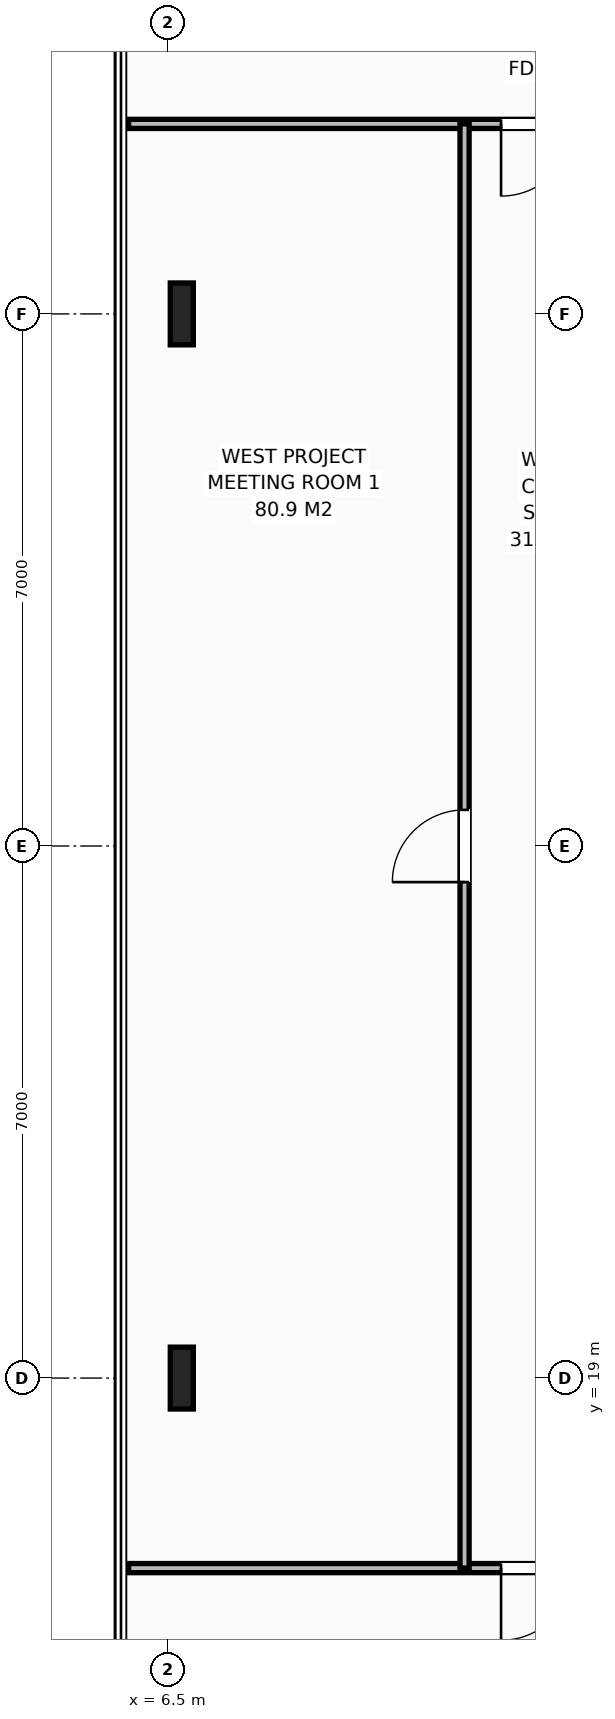
"""IFC4 building model, lengths in metres.
Left out: names, types, materials, properties, quantities, classifications, styles, units other than length and angle.
Written with IfcOpenShell. Run it as: python <this file> out.ifc"""

import sys

from ifc_helpers import new_model, si_unit, direction, frame, frame_2d, origin, origin_2d, place, context, subcontext, project, spatial, rectangle, i_section, extrude, element, fill, save


model = new_model("IFC4")
c1 = context("Model", 3, precision=1e-05, world=origin(), true_north=direction((0.0, 1.0)))
c2 = subcontext(c1, "Body", "Model", "MODEL_VIEW")
j1 = project(units=[si_unit("LENGTHUNIT", "METRE"), si_unit("PLANEANGLEUNIT", "RADIAN")], contexts=[c1])
p1 = place(None, origin())
s1 = spatial("IfcSite", under=j1, at=p1, CompositionType="ELEMENT")
p2 = place(p1, origin())
s2 = spatial("IfcBuilding", under=s1, at=p2, CompositionType="ELEMENT")
p3 = place(p2, frame((0.0, 0.0, 244.2)))
s3 = spatial("IfcBuildingStorey", under=s2, at=p3, CompositionType="ELEMENT", Elevation=244.2)
for number, where, z_axis, x_axis in (
    (1, (6.68, 19.0, 0.0), (0.0, 0.0, 1.0), (1.0, 0.0, 0.0)),
    (2, (6.68, 33.0, 0.0), (0.0, 0.0, 1.0), (1.0, 0.0, 0.0)),
):
    element("IfcColumn", number, at=place(p3, frame(where, z_axis=z_axis, x_axis=x_axis)), inside=s3, PredefinedType="COLUMN", context=c2, shape_type="SweptSolid", body=[
        extrude(i_section(OverallWidth=0.303, OverallDepth=0.814, WebThickness=0.021, FlangeThickness=0.04, at=origin_2d()), origin(), (0.0, 0.0, 1.0), 3.8),
    ])
p4 = place(p3, frame((5.98, 35.5, 0.0), z_axis=(0.0, 0.0, 1.0), x_axis=(1.0, 0.0, 0.0)))
e3 = element("IfcWall", 3, at=p4, inside=s3, PredefinedType="PARTITIONING", context=c2, shape_type="SweptSolid", body=[
    extrude(rectangle(XDim=11.642, YDim=0.12, at=frame_2d((5.821, 0.0))), origin(), (0.0, 0.0, 1.0), 3.58),
])
p5 = place(p4, frame((4.9, 0.0, 0.0)))
e4 = element("IfcOpeningElement", 4, at=p5, cuts=e3, PredefinedType="OPENING", context=c2, shape_type="SweptSolid", body=[
    extrude(rectangle(XDim=0.95, YDim=2.15, at=frame_2d((0.475, 1.075))), frame((0.0, 0.07, 0.0), z_axis=(0.0, -1.0, 0.0), x_axis=(1.0, 0.0, 0.0)), (0.0, 0.0, 1.0), 0.14),
])
p6 = place(p3, frame((5.98, 16.5, 0.0), z_axis=(0.0, 0.0, 1.0), x_axis=(1.0, 0.0, 0.0)))
e5 = element("IfcWall", 5, at=p6, inside=s3, PredefinedType="PARTITIONING", context=c2, shape_type="SweptSolid", body=[
    extrude(rectangle(XDim=7.16, YDim=0.12, at=frame_2d((3.58, 0.0))), origin(), (0.0, 0.0, 1.0), 3.58),
])
p7 = place(p6, frame((4.9, 0.0, 0.0)))
e6 = element("IfcOpeningElement", 6, at=p7, cuts=e5, PredefinedType="OPENING", context=c2, shape_type="SweptSolid", body=[
    extrude(rectangle(XDim=0.95, YDim=2.15, at=frame_2d((0.475, 1.075))), frame((0.0, 0.07, 0.0), z_axis=(0.0, -1.0, 0.0), x_axis=(1.0, 0.0, 0.0)), (0.0, 0.0, 1.0), 0.14),
])
p8 = place(p3, frame((10.4, 16.5, 0.0), z_axis=(0.0, 0.0, 1.0), x_axis=(0.0, 1.0, 0.0)))
e7 = element("IfcWall", 7, at=p8, inside=s3, PredefinedType="PARTITIONING", context=c2, shape_type="SweptSolid", body=[
    extrude(rectangle(XDim=19.0, YDim=0.12, at=frame_2d((9.5, 0.0))), origin(), (0.0, 0.0, 1.0), 3.58),
])
p9 = place(p8, frame((9.025, 0.0, 0.0)))
e8 = element("IfcOpeningElement", 8, at=p9, cuts=e7, PredefinedType="OPENING", context=c2, shape_type="SweptSolid", body=[
    extrude(rectangle(XDim=0.95, YDim=2.15, at=frame_2d((0.475, 1.075))), frame((0.0, 0.07, 0.0), z_axis=(0.0, -1.0, 0.0), x_axis=(1.0, 0.0, 0.0)), (0.0, 0.0, 1.0), 0.14),
])
p10 = place(p5, origin())
e9 = element("IfcDoor", 9, at=p10, inside=s3, OperationType="SINGLE_SWING_RIGHT", PredefinedType="DOOR", context=c2, shape_type="SweptSolid", body=[
    extrude(rectangle(XDim=0.95, YDim=2.15, at=frame_2d((0.475, 1.075))), frame((0.0, 0.025, 0.0), z_axis=(0.0, -1.0, 0.0), x_axis=(1.0, 0.0, 0.0)), (0.0, 0.0, 1.0), 0.05),
])
fill(e4, e9)
p11 = place(p7, origin())
e10 = element("IfcDoor", 10, at=p11, inside=s3, OperationType="SINGLE_SWING_RIGHT", PredefinedType="DOOR", context=c2, shape_type="SweptSolid", body=[
    extrude(rectangle(XDim=0.95, YDim=2.15, at=frame_2d((0.475, 1.075))), frame((0.0, 0.025, 0.0), z_axis=(0.0, -1.0, 0.0), x_axis=(1.0, 0.0, 0.0)), (0.0, 0.0, 1.0), 0.05),
])
fill(e6, e10)
p12 = place(p9, origin())
e11 = element("IfcDoor", 11, at=p12, inside=s3, OperationType="SINGLE_SWING_LEFT", PredefinedType="DOOR", context=c2, shape_type="SweptSolid", body=[
    extrude(rectangle(XDim=0.95, YDim=2.15, at=frame_2d((0.475, 1.075))), frame((0.0, 0.025, 0.0), z_axis=(0.0, -1.0, 0.0), x_axis=(1.0, 0.0, 0.0)), (0.0, 0.0, 1.0), 0.05),
])
fill(e8, e11)
save(model, sys.argv[1])
